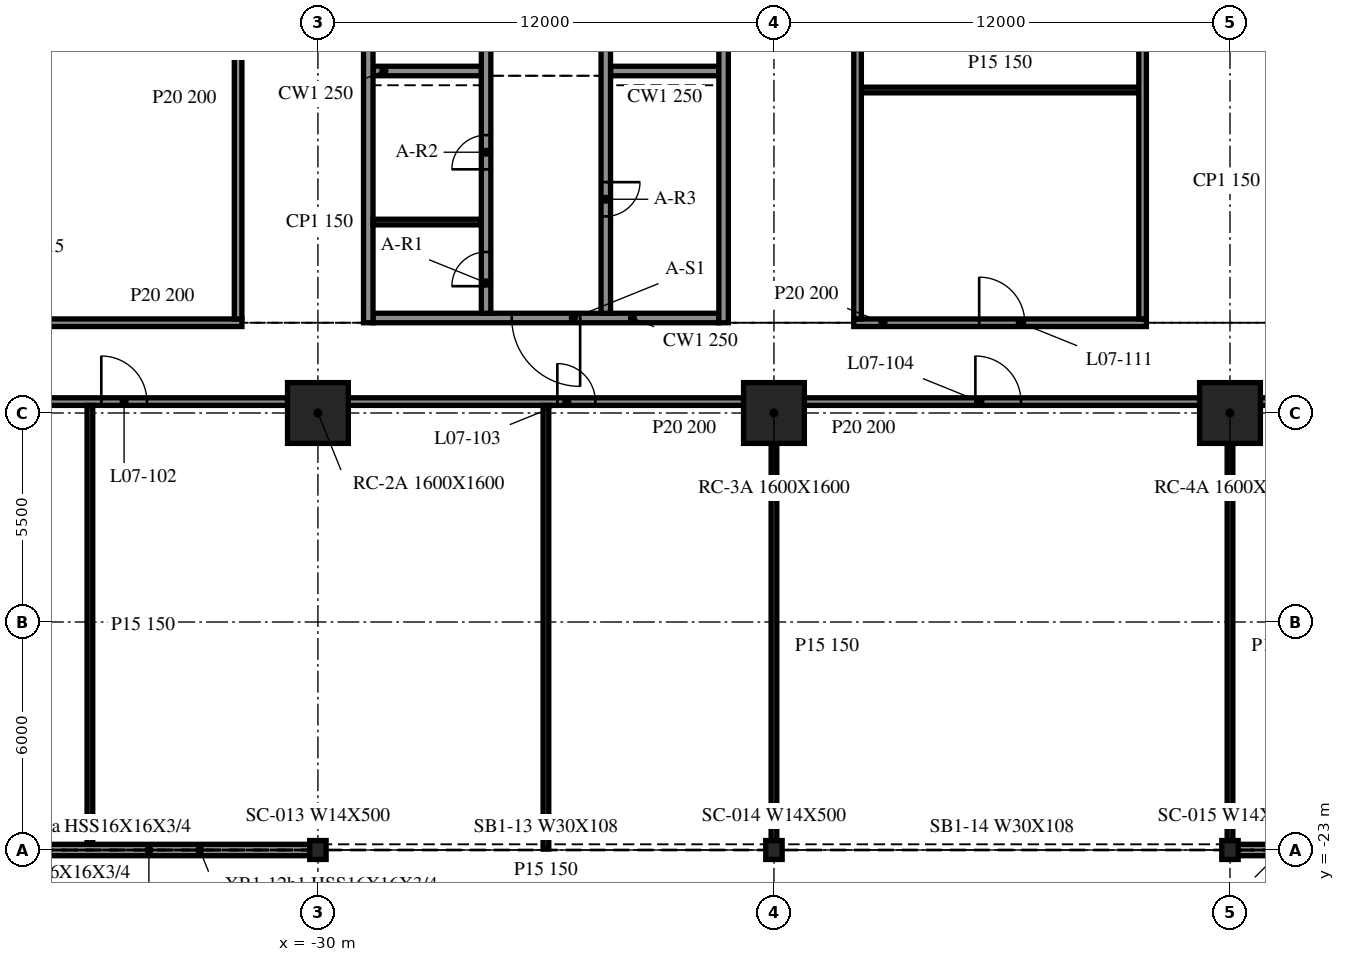
"""IFC4 building model, lengths in metres.
Left out: names, types, materials, properties, quantities, classifications, styles, units other than length and angle.
Written with IfcOpenShell. Run it as: python <this file> out.ifc"""

import sys

from ifc_helpers import new_model, si_unit, direction, frame, frame_2d, origin, origin_2d, place, context, subcontext, project, spatial, rectangle, i_section, extrude, element, fill, save


model = new_model("IFC4")
c1 = context("Model", 3, precision=1e-05, world=origin(), true_north=direction((0.0, 1.0)))
c2 = subcontext(c1, "Body", "Model", "MODEL_VIEW")
j1 = project(units=[si_unit("LENGTHUNIT", "METRE"), si_unit("PLANEANGLEUNIT", "RADIAN")], contexts=[c1])
p1 = place(None, origin())
s1 = spatial("IfcSite", under=j1, at=p1, CompositionType="ELEMENT")
p2 = place(p1, origin())
s2 = spatial("IfcBuilding", under=s1, at=p2, CompositionType="ELEMENT")
p3 = place(p2, frame((0.0, 0.0, 33.0)))
s3 = spatial("IfcBuildingStorey", under=s2, at=p3, CompositionType="ELEMENT", Elevation=33.0)
for number, where, z_axis, x_axis in (
    (1, (-30.0, -11.5, -0.34), (0.0, 0.0, 1.0), (1.0, 0.0, 0.0)),
    (2, (-18.0, -11.5, -0.34), (0.0, 0.0, 1.0), (1.0, 0.0, 0.0)),
    (3, (-6.0, -11.5, -0.34), (0.0, 0.0, 1.0), (1.0, 0.0, 0.0)),
):
    element("IfcColumn", number, at=place(p3, frame(where, z_axis=z_axis, x_axis=x_axis)), inside=s3, PredefinedType="COLUMN", context=c2, shape_type="SweptSolid", body=[
        extrude(rectangle(XDim=1.6, YDim=1.6, at=origin_2d()), origin(), (0.0, 0.0, 1.0), 4.3),
    ])
for number, where, z_axis, x_axis in (
    (4, (-30.0, -23.0, -0.34), (0.0, 0.0, 1.0), (1.0, 0.0, 0.0)),
    (5, (-18.0, -23.0, -0.34), (0.0, 0.0, 1.0), (1.0, 0.0, 0.0)),
    (6, (-6.0, -23.0, -0.34), (0.0, 0.0, 1.0), (1.0, 0.0, 0.0)),
):
    element("IfcColumn", number, at=place(p3, frame(where, z_axis=z_axis, x_axis=x_axis)), inside=s3, PredefinedType="COLUMN", context=c2, shape_type="SweptSolid", body=[
        extrude(i_section(OverallWidth=0.432, OverallDepth=0.498, WebThickness=0.056, FlangeThickness=0.089, at=origin_2d()), origin(), (0.0, 0.0, 1.0), 4.3),
    ])
for number, where, z_axis, x_axis in (
    (7, (-41.972, -23.0, 0.0), (0.0, 0.0, 1.0), (1.0, 0.0, 0.0)),
    (8, (-5.972, -23.0, 0.0), (0.0, 0.0, 1.0), (1.0, 0.0, 0.0)),
):
    element("IfcWall", number, at=place(p3, frame(where, z_axis=z_axis, x_axis=x_axis)), inside=s3, PredefinedType="NOTDEFINED", context=c2, shape_type="SweptSolid", body=[
        extrude(rectangle(XDim=11.944, YDim=0.3, at=frame_2d((5.972, 0.0))), origin(), (0.0, 0.0, 1.0), 3.203),
    ])
for number, where, z_axis, x_axis in (
    (9, (-28.675, 15.125, 0.0), (0.0, 0.0, 1.0), (0.0, -1.0, 0.0)),
    (10, (-19.325, -9.125, 0.0), (0.0, 0.0, 1.0), (0.0, 1.0, 0.0)),
):
    element("IfcWall", number, at=place(p3, frame(where, z_axis=z_axis, x_axis=x_axis)), inside=s3, PredefinedType="SOLIDWALL", context=c2, shape_type="SweptSolid", body=[
        extrude(rectangle(XDim=24.25, YDim=0.25, at=frame_2d((12.125, 0.0))), origin(), (0.0, 0.0, 1.0), 3.96),
    ])
p4 = place(p3, frame((-19.45, -9.0, 0.0), z_axis=(0.0, 0.0, 1.0), x_axis=(-1.0, 0.0, 0.0)))
e11 = element("IfcWall", 11, at=p4, inside=s3, PredefinedType="SOLIDWALL", context=c2, shape_type="SweptSolid", body=[
    extrude(rectangle(XDim=9.1, YDim=0.25, at=frame_2d((4.55, 0.0))), origin(), (0.0, 0.0, 1.0), 3.96),
])
p5 = place(p4, frame((3.65, 0.0, 0.0)))
e12 = element("IfcOpeningElement", 12, at=p5, cuts=e11, PredefinedType="OPENING", context=c2, shape_type="SweptSolid", body=[
    extrude(rectangle(XDim=1.8, YDim=2.1, at=frame_2d((0.9, 1.05))), frame((0.0, 0.135, 0.0), z_axis=(0.0, -1.0, 0.0), x_axis=(1.0, 0.0, 0.0)), (0.0, 0.0, 1.0), 0.27),
])
p6 = place(p3, frame((-25.575, -8.875, 0.0), z_axis=(0.0, 0.0, 1.0), x_axis=(0.0, 1.0, 0.0)))
e13 = element("IfcWall", 13, at=p6, inside=s3, PredefinedType="SOLIDWALL", context=c2, shape_type="SweptSolid", body=[
    extrude(rectangle(XDim=17.5, YDim=0.25, at=frame_2d((8.75, 0.0))), origin(), (0.0, 0.0, 1.0), 3.96),
])
p7 = place(p6, frame((7.2, 0.0, 0.0)))
e14 = element("IfcOpeningElement", 14, at=p7, cuts=e13, PredefinedType="OPENING", context=c2, shape_type="SweptSolid", body=[
    extrude(rectangle(XDim=1.1, YDim=2.1, at=frame_2d((0.55, 1.05))), frame((0.0, 0.135, 0.0), z_axis=(0.0, -1.0, 0.0), x_axis=(1.0, 0.0, 0.0)), (0.0, 0.0, 1.0), 0.27),
])
p8 = place(p6, frame((9.95, 0.0, 0.0)))
e15 = element("IfcOpeningElement", 15, at=p8, cuts=e13, PredefinedType="OPENING", context=c2, shape_type="SweptSolid", body=[
    extrude(rectangle(XDim=1.1, YDim=2.1, at=frame_2d((0.55, 1.05))), frame((0.0, 0.135, 0.0), z_axis=(0.0, -1.0, 0.0), x_axis=(1.0, 0.0, 0.0)), (0.0, 0.0, 1.0), 0.27),
])
p9 = place(p6, frame((12.7, 0.0, 0.0)))
e16 = element("IfcOpeningElement", 16, at=p9, cuts=e13, PredefinedType="OPENING", context=c2, shape_type="SweptSolid", body=[
    extrude(rectangle(XDim=1.1, YDim=2.1, at=frame_2d((0.55, 1.05))), frame((0.0, 0.135, 0.0), z_axis=(0.0, -1.0, 0.0), x_axis=(1.0, 0.0, 0.0)), (0.0, 0.0, 1.0), 0.27),
])
p10 = place(p6, frame((15.45, 0.0, 0.0)))
e17 = element("IfcOpeningElement", 17, at=p10, cuts=e13, PredefinedType="OPENING", context=c2, shape_type="SweptSolid", body=[
    extrude(rectangle(XDim=1.1, YDim=2.1, at=frame_2d((0.55, 1.05))), frame((0.0, 0.135, 0.0), z_axis=(0.0, -1.0, 0.0), x_axis=(1.0, 0.0, 0.0)), (0.0, 0.0, 1.0), 0.27),
])
p11 = place(p6, frame((0.712, 0.0, 0.0)))
e18 = element("IfcOpeningElement", 18, at=p11, cuts=e13, PredefinedType="OPENING", context=c2, shape_type="SweptSolid", body=[
    extrude(rectangle(XDim=0.9, YDim=2.1, at=frame_2d((0.45, 1.05))), frame((0.0, 0.135, 0.0), z_axis=(0.0, -1.0, 0.0), x_axis=(1.0, 0.0, 0.0)), (0.0, 0.0, 1.0), 0.27),
])
p12 = place(p6, frame((3.788, 0.0, 0.0)))
e19 = element("IfcOpeningElement", 19, at=p12, cuts=e13, PredefinedType="OPENING", context=c2, shape_type="SweptSolid", body=[
    extrude(rectangle(XDim=0.9, YDim=2.1, at=frame_2d((0.45, 1.05))), frame((0.0, 0.135, 0.0), z_axis=(0.0, -1.0, 0.0), x_axis=(1.0, 0.0, 0.0)), (0.0, 0.0, 1.0), 0.27),
])
p13 = place(p3, frame((-22.425, 14.875, 0.0), z_axis=(0.0, 0.0, 1.0), x_axis=(0.0, -1.0, 0.0)))
e20 = element("IfcWall", 20, at=p13, inside=s3, PredefinedType="SOLIDWALL", context=c2, shape_type="SweptSolid", body=[
    extrude(rectangle(XDim=23.75, YDim=0.25, at=frame_2d((11.875, 0.0))), origin(), (0.0, 0.0, 1.0), 3.96),
])
p14 = place(p13, frame((15.45, 0.0, 0.0)))
e21 = element("IfcOpeningElement", 21, at=p14, cuts=e20, PredefinedType="OPENING", context=c2, shape_type="SweptSolid", body=[
    extrude(rectangle(XDim=1.1, YDim=2.1, at=frame_2d((0.55, 1.05))), frame((0.0, 0.135, 0.0), z_axis=(0.0, -1.0, 0.0), x_axis=(1.0, 0.0, 0.0)), (0.0, 0.0, 1.0), 0.27),
])
p15 = place(p13, frame((12.7, 0.0, 0.0)))
e22 = element("IfcOpeningElement", 22, at=p15, cuts=e20, PredefinedType="OPENING", context=c2, shape_type="SweptSolid", body=[
    extrude(rectangle(XDim=1.1, YDim=2.1, at=frame_2d((0.55, 1.05))), frame((0.0, 0.135, 0.0), z_axis=(0.0, -1.0, 0.0), x_axis=(1.0, 0.0, 0.0)), (0.0, 0.0, 1.0), 0.27),
])
p16 = place(p13, frame((20.3, 0.0, 0.0)))
e23 = element("IfcOpeningElement", 23, at=p16, cuts=e20, PredefinedType="OPENING", context=c2, shape_type="SweptSolid", body=[
    extrude(rectangle(XDim=0.9, YDim=2.1, at=frame_2d((0.45, 1.05))), frame((0.0, 0.135, 0.0), z_axis=(0.0, -1.0, 0.0), x_axis=(1.0, 0.0, 0.0)), (0.0, 0.0, 1.0), 0.27),
])
p17 = place(p13, frame((3.847, 0.0, 0.0)))
e24 = element("IfcOpeningElement", 24, at=p17, cuts=e20, PredefinedType="OPENING", context=c2, shape_type="SweptSolid", body=[
    extrude(rectangle(XDim=0.9, YDim=2.1, at=frame_2d((0.45, 1.05))), frame((0.0, 0.135, 0.0), z_axis=(0.0, -1.0, 0.0), x_axis=(1.0, 0.0, 0.0)), (0.0, 0.0, 1.0), 0.27),
])
p18 = place(p13, frame((0.772, 0.0, 0.0)))
e25 = element("IfcOpeningElement", 25, at=p18, cuts=e20, PredefinedType="OPENING", context=c2, shape_type="SweptSolid", body=[
    extrude(rectangle(XDim=0.9, YDim=2.1, at=frame_2d((0.45, 1.05))), frame((0.0, 0.135, 0.0), z_axis=(0.0, -1.0, 0.0), x_axis=(1.0, 0.0, 0.0)), (0.0, 0.0, 1.0), 0.27),
])
for number, where, z_axis, x_axis in (
    (26, (-28.55, -2.5, 0.0), (0.0, 0.0, 1.0), (1.0, 0.0, 0.0)),
    (27, (-22.3, -2.5, 0.0), (0.0, 0.0, 1.0), (1.0, 0.0, 0.0)),
):
    element("IfcWall", number, at=place(p3, frame(where, z_axis=z_axis, x_axis=x_axis)), inside=s3, PredefinedType="SOLIDWALL", context=c2, shape_type="SweptSolid", body=[
        extrude(rectangle(XDim=2.85, YDim=0.25, at=frame_2d((1.425, 0.0))), origin(), (0.0, 0.0, 1.0), 3.96),
    ])
p19 = place(p3, frame((-28.55, -6.475, 0.0), z_axis=(0.0, 0.0, 1.0), x_axis=(1.0, 0.0, 0.0)))
e28 = element("IfcWall", 28, at=p19, inside=s3, PredefinedType="PARTITIONING", context=c2, shape_type="SweptSolid", body=[
    extrude(rectangle(XDim=2.85, YDim=0.15, at=frame_2d((1.425, 0.0))), origin(), (0.0, 0.0, 1.0), 3.96),
])
p20 = place(p3, frame((-41.2, -11.2, 0.0), z_axis=(0.0, 0.0, 1.0), x_axis=(1.0, 0.0, 0.0)))
e29 = element("IfcWall", 29, at=p20, inside=s3, PredefinedType="PARTITIONING", context=c2, shape_type="SweptSolid", body=[
    extrude(rectangle(XDim=10.4, YDim=0.2, at=frame_2d((5.2, 0.0))), origin(), (0.0, 0.0, 1.0), 3.96),
])
p21 = place(p20, frame((5.5, 0.0, 0.0)))
e30 = element("IfcOpeningElement", 30, at=p21, cuts=e29, PredefinedType="OPENING", context=c2, shape_type="SweptSolid", body=[
    extrude(rectangle(XDim=1.2, YDim=2.1, at=frame_2d((0.6, 1.05))), frame((0.0, 0.11, 0.0), z_axis=(0.0, -1.0, 0.0), x_axis=(1.0, 0.0, 0.0)), (0.0, 0.0, 1.0), 0.22),
])
p22 = place(p3, frame((-29.2, -11.2, 0.0), z_axis=(0.0, 0.0, 1.0), x_axis=(1.0, 0.0, 0.0)))
e31 = element("IfcWall", 31, at=p22, inside=s3, PredefinedType="PARTITIONING", context=c2, shape_type="SweptSolid", body=[
    extrude(rectangle(XDim=10.4, YDim=0.2, at=frame_2d((5.2, 0.0))), origin(), (0.0, 0.0, 1.0), 3.96),
])
p23 = place(p22, frame((5.5, 0.0, 0.0)))
e32 = element("IfcOpeningElement", 32, at=p23, cuts=e31, PredefinedType="OPENING", context=c2, shape_type="SweptSolid", body=[
    extrude(rectangle(XDim=1.0, YDim=2.1, at=frame_2d((0.5, 1.05))), frame((0.0, 0.11, 0.0), z_axis=(0.0, -1.0, 0.0), x_axis=(1.0, 0.0, 0.0)), (0.0, 0.0, 1.0), 0.22),
])
p24 = place(p3, frame((-17.2, -11.2, 0.0), z_axis=(0.0, 0.0, 1.0), x_axis=(1.0, 0.0, 0.0)))
e33 = element("IfcWall", 33, at=p24, inside=s3, PredefinedType="PARTITIONING", context=c2, shape_type="SweptSolid", body=[
    extrude(rectangle(XDim=10.4, YDim=0.2, at=frame_2d((5.2, 0.0))), origin(), (0.0, 0.0, 1.0), 3.96),
])
p25 = place(p24, frame((4.5, 0.0, 0.0)))
e34 = element("IfcOpeningElement", 34, at=p25, cuts=e33, PredefinedType="OPENING", context=c2, shape_type="SweptSolid", body=[
    extrude(rectangle(XDim=1.2, YDim=2.1, at=frame_2d((0.6, 1.05))), frame((0.0, 0.11, 0.0), z_axis=(0.0, -1.0, 0.0), x_axis=(1.0, 0.0, 0.0)), (0.0, 0.0, 1.0), 0.22),
])
p26 = place(p3, frame((-5.2, -11.2, 0.0), z_axis=(0.0, 0.0, 1.0), x_axis=(1.0, 0.0, 0.0)))
e35 = element("IfcWall", 35, at=p26, inside=s3, PredefinedType="PARTITIONING", context=c2, shape_type="SweptSolid", body=[
    extrude(rectangle(XDim=10.4, YDim=0.2, at=frame_2d((5.2, 0.0))), origin(), (0.0, 0.0, 1.0), 3.96),
])
p27 = place(p26, frame((4.7, 0.0, 0.0)))
e36 = element("IfcOpeningElement", 36, at=p27, cuts=e35, PredefinedType="OPENING", context=c2, shape_type="SweptSolid", body=[
    extrude(rectangle(XDim=1.0, YDim=2.1, at=frame_2d((0.5, 1.05))), frame((0.0, 0.11, 0.0), z_axis=(0.0, -1.0, 0.0), x_axis=(1.0, 0.0, 0.0)), (0.0, 0.0, 1.0), 0.22),
])
p28 = place(p3, frame((-45.95, -9.125, 0.0), z_axis=(0.0, 0.0, 1.0), x_axis=(1.0, 0.0, 0.0)))
e37 = element("IfcWall", 37, at=p28, inside=s3, PredefinedType="PARTITIONING", context=c2, shape_type="SweptSolid", body=[
    extrude(rectangle(XDim=13.95, YDim=0.2, at=frame_2d((6.975, 0.0))), origin(), (0.0, 0.0, 1.0), 3.96),
])
p29 = place(p28, frame((5.5, 0.0, 0.0)))
e38 = element("IfcOpeningElement", 38, at=p29, cuts=e37, PredefinedType="OPENING", context=c2, shape_type="SweptSolid", body=[
    extrude(rectangle(XDim=1.2, YDim=2.1, at=frame_2d((0.6, 1.05))), frame((0.0, 0.11, 0.0), z_axis=(0.0, -1.0, 0.0), x_axis=(1.0, 0.0, 0.0)), (0.0, 0.0, 1.0), 0.22),
])
p30 = place(p28, frame((7.3, 0.0, 0.0)))
e39 = element("IfcOpeningElement", 39, at=p30, cuts=e37, PredefinedType="OPENING", context=c2, shape_type="SweptSolid", body=[
    extrude(rectangle(XDim=1.2, YDim=2.1, at=frame_2d((0.6, 1.05))), frame((0.0, 0.11, 0.0), z_axis=(0.0, -1.0, 0.0), x_axis=(1.0, 0.0, 0.0)), (0.0, 0.0, 1.0), 0.22),
])
p31 = place(p3, frame((-15.9, -9.125, 0.0), z_axis=(0.0, 0.0, 1.0), x_axis=(1.0, 0.0, 0.0)))
e40 = element("IfcWall", 40, at=p31, inside=s3, PredefinedType="PARTITIONING", context=c2, shape_type="SweptSolid", body=[
    extrude(rectangle(XDim=7.7, YDim=0.2, at=frame_2d((3.85, 0.0))), origin(), (0.0, 0.0, 1.0), 3.96),
])
p32 = place(p31, frame((3.3, 0.0, 0.0)))
e41 = element("IfcOpeningElement", 41, at=p32, cuts=e40, PredefinedType="OPENING", context=c2, shape_type="SweptSolid", body=[
    extrude(rectangle(XDim=1.2, YDim=2.1, at=frame_2d((0.6, 1.05))), frame((0.0, 0.11, 0.0), z_axis=(0.0, -1.0, 0.0), x_axis=(1.0, 0.0, 0.0)), (0.0, 0.0, 1.0), 0.22),
])
p33 = place(p3, frame((-15.7, -3.0, 0.0), z_axis=(0.0, 0.0, 1.0), x_axis=(1.0, 0.0, 0.0)))
e42 = element("IfcWall", 42, at=p33, inside=s3, PredefinedType="PARTITIONING", context=c2, shape_type="SweptSolid", body=[
    extrude(rectangle(XDim=7.3, YDim=0.15, at=frame_2d((3.65, 0.0))), origin(), (0.0, 0.0, 1.0), 3.96),
])
p34 = place(p3, frame((-36.0, -22.85, 0.0), z_axis=(0.0, 0.0, 1.0), x_axis=(0.0, 1.0, 0.0)))
e43 = element("IfcWall", 43, at=p34, inside=s3, PredefinedType="PARTITIONING", context=c2, shape_type="SweptSolid", body=[
    extrude(rectangle(XDim=11.55, YDim=0.15, at=frame_2d((5.775, 0.0))), origin(), (0.0, 0.0, 1.0), 3.96),
])
p35 = place(p3, frame((-32.1, -9.025, 0.0), z_axis=(0.0, 0.0, 1.0), x_axis=(0.0, 1.0, 0.0)))
e44 = element("IfcWall", 44, at=p35, inside=s3, PredefinedType="PARTITIONING", context=c2, shape_type="SweptSolid", body=[
    extrude(rectangle(XDim=24.05, YDim=0.2, at=frame_2d((12.025, 0.0))), origin(), (0.0, 0.0, 1.0), 3.96),
])
p36 = place(p35, frame((11.5, 0.0, 0.0)))
e45 = element("IfcOpeningElement", 45, at=p36, cuts=e44, PredefinedType="OPENING", context=c2, shape_type="SweptSolid", body=[
    extrude(rectangle(XDim=1.0, YDim=2.1, at=frame_2d((0.5, 1.05))), frame((0.0, 0.11, 0.0), z_axis=(0.0, -1.0, 0.0), x_axis=(1.0, 0.0, 0.0)), (0.0, 0.0, 1.0), 0.22),
])
p37 = place(p3, frame((-24.0, -22.975, 0.0), z_axis=(0.0, 0.0, 1.0), x_axis=(0.0, 1.0, 0.0)))
e46 = element("IfcWall", 46, at=p37, inside=s3, PredefinedType="PARTITIONING", context=c2, shape_type="SweptSolid", body=[
    extrude(rectangle(XDim=11.675, YDim=0.15, at=frame_2d((5.837, 0.0))), origin(), (0.0, 0.0, 1.0), 3.96),
])
p38 = place(p3, frame((-18.0, -22.975, 0.0), z_axis=(0.0, 0.0, 1.0), x_axis=(0.0, 1.0, 0.0)))
e47 = element("IfcWall", 47, at=p38, inside=s3, PredefinedType="PARTITIONING", context=c2, shape_type="SweptSolid", body=[
    extrude(rectangle(XDim=10.675, YDim=0.15, at=frame_2d((5.337, 0.0))), origin(), (0.0, 0.0, 1.0), 3.96),
])
p39 = place(p3, frame((-15.8, -9.025, 0.0), z_axis=(0.0, 0.0, 1.0), x_axis=(0.0, 1.0, 0.0)))
e48 = element("IfcWall", 48, at=p39, inside=s3, PredefinedType="PARTITIONING", context=c2, shape_type="SweptSolid", body=[
    extrude(rectangle(XDim=24.05, YDim=0.2, at=frame_2d((12.025, 0.0))), origin(), (0.0, 0.0, 1.0), 3.96),
])
p40 = place(p39, frame((11.5, 0.0, 0.0)))
e49 = element("IfcOpeningElement", 49, at=p40, cuts=e48, PredefinedType="OPENING", context=c2, shape_type="SweptSolid", body=[
    extrude(rectangle(XDim=1.0, YDim=2.1, at=frame_2d((0.5, 1.05))), frame((0.0, 0.11, 0.0), z_axis=(0.0, -1.0, 0.0), x_axis=(1.0, 0.0, 0.0)), (0.0, 0.0, 1.0), 0.22),
])
p41 = place(p3, frame((-8.3, -9.025, 0.0), z_axis=(0.0, 0.0, 1.0), x_axis=(0.0, 1.0, 0.0)))
e50 = element("IfcWall", 50, at=p41, inside=s3, PredefinedType="PARTITIONING", context=c2, shape_type="SweptSolid", body=[
    extrude(rectangle(XDim=24.05, YDim=0.2, at=frame_2d((12.025, 0.0))), origin(), (0.0, 0.0, 1.0), 3.96),
])
p42 = place(p3, frame((-6.0, -22.975, 0.0), z_axis=(0.0, 0.0, 1.0), x_axis=(0.0, 1.0, 0.0)))
e51 = element("IfcWall", 51, at=p42, inside=s3, PredefinedType="PARTITIONING", context=c2, shape_type="SweptSolid", body=[
    extrude(rectangle(XDim=10.675, YDim=0.15, at=frame_2d((5.337, 0.0))), origin(), (0.0, 0.0, 1.0), 3.96),
])
p43 = place(p5, origin())
e52 = element("IfcDoor", 52, at=p43, inside=s3, OperationType="DOUBLE_DOOR_SINGLE_SWING", PredefinedType="DOOR", context=c2, shape_type="SweptSolid", body=[
    extrude(rectangle(XDim=1.8, YDim=2.1, at=frame_2d((0.9, 1.05))), frame((0.0, 0.025, 0.0), z_axis=(0.0, -1.0, 0.0), x_axis=(1.0, 0.0, 0.0)), (0.0, 0.0, 1.0), 0.05),
])
fill(e12, e52)
p44 = place(p11, origin())
e53 = element("IfcDoor", 53, at=p44, inside=s3, OperationType="SINGLE_SWING_LEFT", PredefinedType="DOOR", context=c2, shape_type="SweptSolid", body=[
    extrude(rectangle(XDim=0.9, YDim=2.1, at=frame_2d((0.45, 1.05))), frame((0.0, 0.025, 0.0), z_axis=(0.0, -1.0, 0.0), x_axis=(1.0, 0.0, 0.0)), (0.0, 0.0, 1.0), 0.05),
])
fill(e18, e53)
p45 = place(p12, origin())
e54 = element("IfcDoor", 54, at=p45, inside=s3, OperationType="SINGLE_SWING_RIGHT", PredefinedType="DOOR", context=c2, shape_type="SweptSolid", body=[
    extrude(rectangle(XDim=0.9, YDim=2.1, at=frame_2d((0.45, 1.05))), frame((0.0, 0.025, 0.0), z_axis=(0.0, -1.0, 0.0), x_axis=(1.0, 0.0, 0.0)), (0.0, 0.0, 1.0), 0.05),
])
fill(e19, e54)
p46 = place(p16, origin())
e55 = element("IfcDoor", 55, at=p46, inside=s3, OperationType="SINGLE_SWING_LEFT", PredefinedType="DOOR", context=c2, shape_type="SweptSolid", body=[
    extrude(rectangle(XDim=0.9, YDim=2.1, at=frame_2d((0.45, 1.05))), frame((0.0, 0.025, 0.0), z_axis=(0.0, -1.0, 0.0), x_axis=(1.0, 0.0, 0.0)), (0.0, 0.0, 1.0), 0.05),
])
fill(e23, e55)
p47 = place(p21, origin())
e56 = element("IfcDoor", 56, at=p47, inside=s3, OperationType="SINGLE_SWING_LEFT", PredefinedType="DOOR", context=c2, shape_type="SweptSolid", body=[
    extrude(rectangle(XDim=1.2, YDim=2.1, at=frame_2d((0.6, 1.05))), frame((0.0, 0.025, 0.0), z_axis=(0.0, -1.0, 0.0), x_axis=(1.0, 0.0, 0.0)), (0.0, 0.0, 1.0), 0.05),
])
fill(e30, e56)
p48 = place(p23, origin())
e57 = element("IfcDoor", 57, at=p48, inside=s3, OperationType="SINGLE_SWING_LEFT", PredefinedType="DOOR", context=c2, shape_type="SweptSolid", body=[
    extrude(rectangle(XDim=1.0, YDim=2.1, at=frame_2d((0.5, 1.05))), frame((0.0, 0.025, 0.0), z_axis=(0.0, -1.0, 0.0), x_axis=(1.0, 0.0, 0.0)), (0.0, 0.0, 1.0), 0.05),
])
fill(e32, e57)
p49 = place(p25, origin())
e58 = element("IfcDoor", 58, at=p49, inside=s3, OperationType="SINGLE_SWING_RIGHT", PredefinedType="DOOR", context=c2, shape_type="SweptSolid", body=[
    extrude(rectangle(XDim=1.2, YDim=2.1, at=frame_2d((0.6, 1.05))), frame((0.0, 0.025, 0.0), z_axis=(0.0, -1.0, 0.0), x_axis=(1.0, 0.0, 0.0)), (0.0, 0.0, 1.0), 0.05),
])
fill(e34, e58)
p50 = place(p32, origin())
e59 = element("IfcDoor", 59, at=p50, inside=s3, OperationType="SINGLE_SWING_RIGHT", PredefinedType="DOOR", context=c2, shape_type="SweptSolid", body=[
    extrude(rectangle(XDim=1.2, YDim=2.1, at=frame_2d((0.6, 1.05))), frame((0.0, 0.025, 0.0), z_axis=(0.0, -1.0, 0.0), x_axis=(1.0, 0.0, 0.0)), (0.0, 0.0, 1.0), 0.05),
])
fill(e41, e59)
save(model, sys.argv[1])
